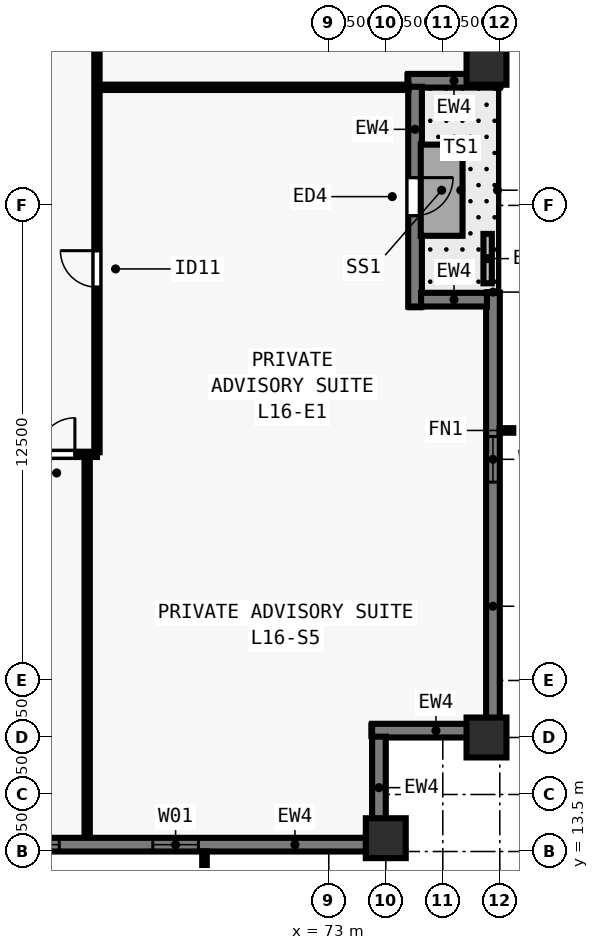
"""IFC4 building model, lengths in metres.
Left out: names, types, materials, properties, quantities, classifications, styles, units other than length and angle.
Written with IfcOpenShell. Run it as: python <this file> out.ifc"""

import sys

from ifc_helpers import new_model, si_unit, direction, frame, frame_2d, origin, origin_2d, place, context, subcontext, project, spatial, rectangle, extrude, element, fill, save


model = new_model("IFC4")
c1 = context("Model", 3, precision=1e-05, world=origin(), true_north=direction((0.0, 1.0)))
c2 = subcontext(c1, "Body", "Model", "MODEL_VIEW")
j1 = project(units=[si_unit("LENGTHUNIT", "METRE"), si_unit("PLANEANGLEUNIT", "RADIAN")], contexts=[c1])
p1 = place(None, origin())
s1 = spatial("IfcSite", under=j1, at=p1, CompositionType="ELEMENT")
p2 = place(p1, origin())
s2 = spatial("IfcBuilding", under=s1, at=p2, CompositionType="ELEMENT")
p3 = place(p2, frame((0.0, 0.0, 62.0)))
s3 = spatial("IfcBuildingStorey", under=s2, at=p3, CompositionType="ELEMENT", Elevation=62.0)
for number, where, z_axis, x_axis in (
    (1, (74.5, 13.85, 0.0), (0.0, 0.0, 1.0), (1.0, 0.0, 0.0)),
    (2, (77.15, 16.5, 0.0), (0.0, 0.0, 1.0), (0.0, 1.0, 0.0)),
    (3, (77.15, 34.2, 0.0), (0.0, 0.0, 1.0), (0.0, 1.0, 0.0)),
):
    element("IfcColumn", number, at=place(p3, frame(where, z_axis=z_axis, x_axis=x_axis)), inside=s3, PredefinedType="COLUMN", context=c2, shape_type="SweptSolid", body=[
        extrude(rectangle(XDim=1.05, YDim=1.05, at=origin_2d()), origin(), (0.0, 0.0, 1.0), 3.5),
    ])
p4 = place(p3, frame((77.32, 28.2, 0.0), z_axis=(0.0, 0.0, 1.0), x_axis=(0.0, -1.0, 0.0)))
e4 = element("IfcWall", 4, at=p4, inside=s3, PredefinedType="SOLIDWALL", context=c2, shape_type="SweptSolid", body=[
    extrude(rectangle(XDim=11.362, YDim=0.36, at=frame_2d((5.681, 0.0))), origin(), (0.0, 0.0, 1.0), 3.28),
])
p5 = place(p4, frame((3.781, 0.0, 0.8)))
e5 = element("IfcOpeningElement", 5, at=p5, cuts=e4, PredefinedType="OPENING", context=c2, shape_type="SweptSolid", body=[
    extrude(rectangle(XDim=1.2, YDim=1.544, at=frame_2d((0.6, 0.772))), frame((0.0, 0.19, 0.0), z_axis=(0.0, -1.0, 0.0), x_axis=(1.0, 0.0, 0.0)), (0.0, 0.0, 1.0), 0.38),
])
p6 = place(p3, frame((77.5, 16.68, 0.0), z_axis=(0.0, 0.0, 1.0), x_axis=(-1.0, 0.0, 0.0)))
e6 = element("IfcWall", 6, at=p6, inside=s3, PredefinedType="SOLIDWALL", context=c2, shape_type="SweptSolid", body=[
    extrude(rectangle(XDim=3.36, YDim=0.36, at=frame_2d((1.68, 0.0))), origin(), (0.0, 0.0, 1.0), 3.28),
])
p7 = place(p3, frame((74.32, 16.522, 0.0), z_axis=(0.0, 0.0, 1.0), x_axis=(0.0, -1.0, 0.0)))
e7 = element("IfcWall", 7, at=p7, inside=s3, PredefinedType="SOLIDWALL", context=c2, shape_type="SweptSolid", body=[
    extrude(rectangle(XDim=2.684, YDim=0.36, at=frame_2d((1.342, 0.0))), origin(), (0.0, 0.0, 1.0), 3.28),
])
p8 = place(p3, frame((74.5, 13.68, 0.0), z_axis=(0.0, 0.0, 1.0), x_axis=(-1.0, 0.0, 0.0)))
e8 = element("IfcWall", 8, at=p8, inside=s3, PredefinedType="SOLIDWALL", context=c2, shape_type="SweptSolid", body=[
    extrude(rectangle(XDim=44.662, YDim=0.36, at=frame_2d((22.331, 0.0))), origin(), (0.0, 0.0, 1.0), 3.28),
])
p9 = place(p8, frame((4.93, 0.0, 0.8)))
e9 = element("IfcOpeningElement", 9, at=p9, cuts=e8, PredefinedType="OPENING", context=c2, shape_type="SweptSolid", body=[
    extrude(rectangle(XDim=1.2, YDim=1.544, at=frame_2d((0.6, 0.772))), frame((0.0, 0.19, 0.0), z_axis=(0.0, -1.0, 0.0), x_axis=(1.0, 0.0, 0.0)), (0.0, 0.0, 1.0), 0.38),
])
p10 = place(p8, frame((8.59, 0.0, 0.8)))
e10 = element("IfcOpeningElement", 10, at=p10, cuts=e8, PredefinedType="OPENING", context=c2, shape_type="SweptSolid", body=[
    extrude(rectangle(XDim=1.5, YDim=1.544, at=frame_2d((0.75, 0.772))), frame((0.0, 0.19, 0.0), z_axis=(0.0, -1.0, 0.0), x_axis=(1.0, 0.0, 0.0)), (0.0, 0.0, 1.0), 0.38),
])
p11 = place(p8, frame((11.65, 0.0, 0.8)))
e11 = element("IfcOpeningElement", 11, at=p11, cuts=e8, PredefinedType="OPENING", context=c2, shape_type="SweptSolid", body=[
    extrude(rectangle(XDim=1.2, YDim=1.544, at=frame_2d((0.6, 0.772))), frame((0.0, 0.19, 0.0), z_axis=(0.0, -1.0, 0.0), x_axis=(1.0, 0.0, 0.0)), (0.0, 0.0, 1.0), 0.38),
])
p12 = place(p8, frame((14.861, 0.0, 0.8)))
e12 = element("IfcOpeningElement", 12, at=p12, cuts=e8, PredefinedType="OPENING", context=c2, shape_type="SweptSolid", body=[
    extrude(rectangle(XDim=1.5, YDim=1.544, at=frame_2d((0.75, 0.772))), frame((0.0, 0.19, 0.0), z_axis=(0.0, -1.0, 0.0), x_axis=(1.0, 0.0, 0.0)), (0.0, 0.0, 1.0), 0.38),
])
p13 = place(p8, frame((18.821, 0.0, 0.8)))
e13 = element("IfcOpeningElement", 13, at=p13, cuts=e8, PredefinedType="OPENING", context=c2, shape_type="SweptSolid", body=[
    extrude(rectangle(XDim=1.2, YDim=1.544, at=frame_2d((0.6, 0.772))), frame((0.0, 0.19, 0.0), z_axis=(0.0, -1.0, 0.0), x_axis=(1.0, 0.0, 0.0)), (0.0, 0.0, 1.0), 0.38),
])
p14 = place(p8, frame((21.581, 0.0, 0.8)))
e14 = element("IfcOpeningElement", 14, at=p14, cuts=e8, PredefinedType="OPENING", context=c2, shape_type="SweptSolid", body=[
    extrude(rectangle(XDim=1.5, YDim=1.544, at=frame_2d((0.75, 0.772))), frame((0.0, 0.19, 0.0), z_axis=(0.0, -1.0, 0.0), x_axis=(1.0, 0.0, 0.0)), (0.0, 0.0, 1.0), 0.38),
])
p15 = place(p8, frame((25.091, 0.0, 0.8)))
e15 = element("IfcOpeningElement", 15, at=p15, cuts=e8, PredefinedType="OPENING", context=c2, shape_type="SweptSolid", body=[
    extrude(rectangle(XDim=1.2, YDim=1.544, at=frame_2d((0.6, 0.772))), frame((0.0, 0.19, 0.0), z_axis=(0.0, -1.0, 0.0), x_axis=(1.0, 0.0, 0.0)), (0.0, 0.0, 1.0), 0.38),
])
p16 = place(p8, frame((28.302, 0.0, 0.8)))
e16 = element("IfcOpeningElement", 16, at=p16, cuts=e8, PredefinedType="OPENING", context=c2, shape_type="SweptSolid", body=[
    extrude(rectangle(XDim=1.5, YDim=1.544, at=frame_2d((0.75, 0.772))), frame((0.0, 0.19, 0.0), z_axis=(0.0, -1.0, 0.0), x_axis=(1.0, 0.0, 0.0)), (0.0, 0.0, 1.0), 0.38),
])
p17 = place(p8, frame((31.812, 0.0, 0.8)))
e17 = element("IfcOpeningElement", 17, at=p17, cuts=e8, PredefinedType="OPENING", context=c2, shape_type="SweptSolid", body=[
    extrude(rectangle(XDim=1.2, YDim=1.544, at=frame_2d((0.6, 0.772))), frame((0.0, 0.19, 0.0), z_axis=(0.0, -1.0, 0.0), x_axis=(1.0, 0.0, 0.0)), (0.0, 0.0, 1.0), 0.38),
])
p18 = place(p8, frame((35.022, 0.0, 0.8)))
e18 = element("IfcOpeningElement", 18, at=p18, cuts=e8, PredefinedType="OPENING", context=c2, shape_type="SweptSolid", body=[
    extrude(rectangle(XDim=1.5, YDim=1.544, at=frame_2d((0.75, 0.772))), frame((0.0, 0.19, 0.0), z_axis=(0.0, -1.0, 0.0), x_axis=(1.0, 0.0, 0.0)), (0.0, 0.0, 1.0), 0.38),
])
p19 = place(p8, frame((38.532, 0.0, 0.8)))
e19 = element("IfcOpeningElement", 19, at=p19, cuts=e8, PredefinedType="OPENING", context=c2, shape_type="SweptSolid", body=[
    extrude(rectangle(XDim=1.2, YDim=1.544, at=frame_2d((0.6, 0.772))), frame((0.0, 0.19, 0.0), z_axis=(0.0, -1.0, 0.0), x_axis=(1.0, 0.0, 0.0)), (0.0, 0.0, 1.0), 0.38),
])
p20 = place(p3, frame((77.32, 61.5, 0.0), z_axis=(0.0, 0.0, 1.0), x_axis=(0.0, -1.0, 0.0)))
e20 = element("IfcWall", 20, at=p20, inside=s3, PredefinedType="SOLIDWALL", context=c2, shape_type="SweptSolid", body=[
    extrude(rectangle(XDim=27.562, YDim=0.36, at=frame_2d((13.781, 0.0))), origin(), (0.0, 0.0, 1.0), 3.28),
])
p21 = place(p20, frame((4.905, 0.0, 0.8)))
e21 = element("IfcOpeningElement", 21, at=p21, cuts=e20, PredefinedType="OPENING", context=c2, shape_type="SweptSolid", body=[
    extrude(rectangle(XDim=1.2, YDim=1.544, at=frame_2d((0.6, 0.772))), frame((0.0, 0.19, 0.0), z_axis=(0.0, -1.0, 0.0), x_axis=(1.0, 0.0, 0.0)), (0.0, 0.0, 1.0), 0.38),
])
p22 = place(p20, frame((8.065, 0.0, 0.8)))
e22 = element("IfcOpeningElement", 22, at=p22, cuts=e20, PredefinedType="OPENING", context=c2, shape_type="SweptSolid", body=[
    extrude(rectangle(XDim=1.5, YDim=1.544, at=frame_2d((0.75, 0.772))), frame((0.0, 0.19, 0.0), z_axis=(0.0, -1.0, 0.0), x_axis=(1.0, 0.0, 0.0)), (0.0, 0.0, 1.0), 0.38),
])
p23 = place(p20, frame((11.526, 0.0, 0.8)))
e23 = element("IfcOpeningElement", 23, at=p23, cuts=e20, PredefinedType="OPENING", context=c2, shape_type="SweptSolid", body=[
    extrude(rectangle(XDim=1.2, YDim=1.544, at=frame_2d((0.6, 0.772))), frame((0.0, 0.19, 0.0), z_axis=(0.0, -1.0, 0.0), x_axis=(1.0, 0.0, 0.0)), (0.0, 0.0, 1.0), 0.38),
])
p24 = place(p20, frame((14.686, 0.0, 0.8)))
e24 = element("IfcOpeningElement", 24, at=p24, cuts=e20, PredefinedType="OPENING", context=c2, shape_type="SweptSolid", body=[
    extrude(rectangle(XDim=1.5, YDim=1.544, at=frame_2d((0.75, 0.772))), frame((0.0, 0.19, 0.0), z_axis=(0.0, -1.0, 0.0), x_axis=(1.0, 0.0, 0.0)), (0.0, 0.0, 1.0), 0.38),
])
p25 = place(p20, frame((18.596, 0.0, 0.8)))
e25 = element("IfcOpeningElement", 25, at=p25, cuts=e20, PredefinedType="OPENING", context=c2, shape_type="SweptSolid", body=[
    extrude(rectangle(XDim=1.2, YDim=1.544, at=frame_2d((0.6, 0.772))), frame((0.0, 0.19, 0.0), z_axis=(0.0, -1.0, 0.0), x_axis=(1.0, 0.0, 0.0)), (0.0, 0.0, 1.0), 0.38),
])
p26 = place(p20, frame((21.307, 0.0, 0.8)))
e26 = element("IfcOpeningElement", 26, at=p26, cuts=e20, PredefinedType="OPENING", context=c2, shape_type="SweptSolid", body=[
    extrude(rectangle(XDim=1.5, YDim=1.544, at=frame_2d((0.75, 0.772))), frame((0.0, 0.19, 0.0), z_axis=(0.0, -1.0, 0.0), x_axis=(1.0, 0.0, 0.0)), (0.0, 0.0, 1.0), 0.38),
])
p27 = place(p3, frame((77.5, 33.78, 0.0), z_axis=(0.0, 0.0, 1.0), x_axis=(-1.0, 0.0, 0.0)))
e27 = element("IfcWall", 27, at=p27, inside=s3, PredefinedType="SOLIDWALL", context=c2, shape_type="SweptSolid", body=[
    extrude(rectangle(XDim=2.41, YDim=0.36, at=frame_2d((1.205, 0.0))), origin(), (0.0, 0.0, 1.0), 3.28),
])
p28 = place(p3, frame((75.27, 33.622, 0.0), z_axis=(0.0, 0.0, 1.0), x_axis=(0.0, -1.0, 0.0)))
e28 = element("IfcWall", 28, at=p28, inside=s3, PredefinedType="SOLIDWALL", context=c2, shape_type="SweptSolid", body=[
    extrude(rectangle(XDim=5.782, YDim=0.36, at=frame_2d((2.891, 0.0))), origin(), (0.0, 0.0, 1.0), 3.28),
])
p29 = place(p28, frame((2.391, 0.0, 0.0)))
e29 = element("IfcOpeningElement", 29, at=p29, cuts=e28, PredefinedType="OPENING", context=c2, shape_type="SweptSolid", body=[
    extrude(rectangle(XDim=1.0, YDim=2.15, at=frame_2d((0.5, 1.075))), frame((0.0, 0.19, 0.0), z_axis=(0.0, -1.0, 0.0), x_axis=(1.0, 0.0, 0.0)), (0.0, 0.0, 1.0), 0.38),
])
p30 = place(p3, frame((75.428, 28.02, 0.0), z_axis=(0.0, 0.0, 1.0), x_axis=(1.0, 0.0, 0.0)))
e30 = element("IfcWall", 30, at=p30, inside=s3, PredefinedType="SOLIDWALL", context=c2, shape_type="SweptSolid", body=[
    extrude(rectangle(XDim=1.734, YDim=0.36, at=frame_2d((0.867, 0.0))), origin(), (0.0, 0.0, 1.0), 3.28),
])
p31 = place(p3, frame((77.18, 28.45, 0.0), z_axis=(0.0, 0.0, 1.0), x_axis=(0.0, 1.0, 0.0)))
e31 = element("IfcWall", 31, at=p31, inside=s3, PredefinedType="PARAPET", context=c2, shape_type="SweptSolid", body=[
    extrude(rectangle(XDim=1.3, YDim=0.22, at=frame_2d((0.65, 0.0))), origin(), (0.0, 0.0, 1.0), 0.55),
])
p32 = place(p3, frame((37.1, 23.95, 0.0), z_axis=(0.0, 0.0, 1.0), x_axis=(1.0, 0.0, 0.0)))
e32 = element("IfcWall", 32, at=p32, inside=s3, PredefinedType="PARTITIONING", context=c2, shape_type="SweptSolid", body=[
    extrude(rectangle(XDim=29.8, YDim=0.14, at=frame_2d((14.9, 0.0))), origin(), (0.0, 0.0, 1.0), 3.28),
])
p33 = place(p32, frame((4.191, 0.0, 0.0)))
e33 = element("IfcOpeningElement", 33, at=p33, cuts=e32, PredefinedType="OPENING", context=c2, shape_type="SweptSolid", body=[
    extrude(rectangle(XDim=0.96, YDim=2.12, at=frame_2d((0.48, 1.06))), frame((0.0, 0.08, 0.0), z_axis=(0.0, -1.0, 0.0), x_axis=(1.0, 0.0, 0.0)), (0.0, 0.0, 1.0), 0.16),
])
p34 = place(p32, frame((5.358, 0.0, 0.0)))
e34 = element("IfcOpeningElement", 34, at=p34, cuts=e32, PredefinedType="OPENING", context=c2, shape_type="SweptSolid", body=[
    extrude(rectangle(XDim=0.96, YDim=2.12, at=frame_2d((0.48, 1.06))), frame((0.0, 0.08, 0.0), z_axis=(0.0, -1.0, 0.0), x_axis=(1.0, 0.0, 0.0)), (0.0, 0.0, 1.0), 0.16),
])
p35 = place(p32, frame((14.51, 0.0, 0.0)))
e35 = element("IfcOpeningElement", 35, at=p35, cuts=e32, PredefinedType="OPENING", context=c2, shape_type="SweptSolid", body=[
    extrude(rectangle(XDim=0.96, YDim=2.12, at=frame_2d((0.48, 1.06))), frame((0.0, 0.08, 0.0), z_axis=(0.0, -1.0, 0.0), x_axis=(1.0, 0.0, 0.0)), (0.0, 0.0, 1.0), 0.16),
])
p36 = place(p32, frame((24.542, 0.0, 0.0)))
e36 = element("IfcOpeningElement", 36, at=p36, cuts=e32, PredefinedType="OPENING", context=c2, shape_type="SweptSolid", body=[
    extrude(rectangle(XDim=0.96, YDim=2.12, at=frame_2d((0.48, 1.06))), frame((0.0, 0.08, 0.0), z_axis=(0.0, -1.0, 0.0), x_axis=(1.0, 0.0, 0.0)), (0.0, 0.0, 1.0), 0.16),
])
p37 = place(p32, frame((28.26, 0.0, 0.0)))
e37 = element("IfcOpeningElement", 37, at=p37, cuts=e32, PredefinedType="OPENING", context=c2, shape_type="SweptSolid", body=[
    extrude(rectangle(XDim=0.96, YDim=2.12, at=frame_2d((0.48, 1.06))), frame((0.0, 0.08, 0.0), z_axis=(0.0, -1.0, 0.0), x_axis=(1.0, 0.0, 0.0)), (0.0, 0.0, 1.0), 0.16),
])
p38 = place(p3, frame((66.9, 24.005, 0.0), z_axis=(0.0, 0.0, 1.0), x_axis=(0.0, 1.0, 0.0)))
e38 = element("IfcWall", 38, at=p38, inside=s3, PredefinedType="PARTITIONING", context=c2, shape_type="SweptSolid", body=[
    extrude(rectangle(XDim=29.99, YDim=0.14, at=frame_2d((14.995, 0.0))), origin(), (0.0, 0.0, 1.0), 3.28),
])
p39 = place(p38, frame((4.344, 0.0, 0.0)))
e39 = element("IfcOpeningElement", 39, at=p39, cuts=e38, PredefinedType="OPENING", context=c2, shape_type="SweptSolid", body=[
    extrude(rectangle(XDim=0.96, YDim=2.12, at=frame_2d((0.48, 1.06))), frame((0.0, 0.08, 0.0), z_axis=(0.0, -1.0, 0.0), x_axis=(1.0, 0.0, 0.0)), (0.0, 0.0, 1.0), 0.16),
])
p40 = place(p38, frame((14.452, 0.0, 0.0)))
e40 = element("IfcOpeningElement", 40, at=p40, cuts=e38, PredefinedType="OPENING", context=c2, shape_type="SweptSolid", body=[
    extrude(rectangle(XDim=0.96, YDim=2.12, at=frame_2d((0.48, 1.06))), frame((0.0, 0.08, 0.0), z_axis=(0.0, -1.0, 0.0), x_axis=(1.0, 0.0, 0.0)), (0.0, 0.0, 1.0), 0.16),
])
p41 = place(p38, frame((24.623, 0.0, 0.0)))
e41 = element("IfcOpeningElement", 41, at=p41, cuts=e38, PredefinedType="OPENING", context=c2, shape_type="SweptSolid", body=[
    extrude(rectangle(XDim=0.96, YDim=2.12, at=frame_2d((0.48, 1.06))), frame((0.0, 0.08, 0.0), z_axis=(0.0, -1.0, 0.0), x_axis=(1.0, 0.0, 0.0)), (0.0, 0.0, 1.0), 0.16),
])
p42 = place(p3, frame((66.643, 13.92, 0.0), z_axis=(0.0, 0.0, 1.0), x_axis=(0.0, 1.0, 0.0)))
e42 = element("IfcWall", 42, at=p42, inside=s3, PredefinedType="PARTITIONING", context=c2, shape_type="SweptSolid", body=[
    extrude(rectangle(XDim=9.93, YDim=0.14, at=frame_2d((4.965, 0.0))), origin(), (0.0, 0.0, 1.0), 2.439),
])
p43 = place(p3, frame((67.0, 33.607, 0.0), z_axis=(0.0, 0.0, 1.0), x_axis=(1.0, 0.0, 0.0)))
e43 = element("IfcWall", 43, at=p43, inside=s3, PredefinedType="PARTITIONING", context=c2, shape_type="SweptSolid", body=[
    extrude(rectangle(XDim=8.1, YDim=0.14, at=frame_2d((4.05, 0.0))), origin(), (0.0, 0.0, 1.0), 2.439),
])
p44 = place(p5, origin())
e44 = element("IfcWindow", 44, at=p44, inside=s3, PartitioningType="SINGLE_PANEL", PredefinedType="WINDOW", context=c2, shape_type="SweptSolid", body=[
    extrude(rectangle(XDim=1.2, YDim=1.544, at=frame_2d((0.6, 0.772))), frame((0.0, -0.05, 0.0), z_axis=(0.0, -1.0, 0.0), x_axis=(1.0, 0.0, 0.0)), (0.0, 0.0, 1.0), 0.06),
])
fill(e5, e44)
p45 = place(p9, origin())
e45 = element("IfcWindow", 45, at=p45, inside=s3, PartitioningType="SINGLE_PANEL", PredefinedType="WINDOW", context=c2, shape_type="SweptSolid", body=[
    extrude(rectangle(XDim=1.2, YDim=1.544, at=frame_2d((0.6, 0.772))), frame((0.0, -0.05, 0.0), z_axis=(0.0, -1.0, 0.0), x_axis=(1.0, 0.0, 0.0)), (0.0, 0.0, 1.0), 0.06),
])
fill(e9, e45)
p46 = place(p10, origin())
e46 = element("IfcWindow", 46, at=p46, inside=s3, PartitioningType="SINGLE_PANEL", PredefinedType="WINDOW", context=c2, shape_type="SweptSolid", body=[
    extrude(rectangle(XDim=1.5, YDim=1.544, at=frame_2d((0.75, 0.772))), frame((0.0, -0.05, 0.0), z_axis=(0.0, -1.0, 0.0), x_axis=(1.0, 0.0, 0.0)), (0.0, 0.0, 1.0), 0.06),
])
fill(e10, e46)
p47 = place(p29, origin())
e47 = element("IfcDoor", 47, at=p47, inside=s3, OperationType="SINGLE_SWING_LEFT", PredefinedType="DOOR", context=c2, shape_type="SweptSolid", body=[
    extrude(rectangle(XDim=1.0, YDim=2.15, at=frame_2d((0.5, 1.075))), frame((0.0, 0.025, 0.0), z_axis=(0.0, -1.0, 0.0), x_axis=(1.0, 0.0, 0.0)), (0.0, 0.0, 1.0), 0.05),
])
fill(e29, e47)
p48 = place(p37, origin())
e48 = element("IfcDoor", 48, at=p48, inside=s3, OperationType="SINGLE_SWING_RIGHT", PredefinedType="DOOR", context=c2, shape_type="SweptSolid", body=[
    extrude(rectangle(XDim=0.96, YDim=2.12, at=frame_2d((0.48, 1.06))), frame((0.0, 0.025, 0.0), z_axis=(0.0, -1.0, 0.0), x_axis=(1.0, 0.0, 0.0)), (0.0, 0.0, 1.0), 0.05),
])
fill(e37, e48)
p49 = place(p39, origin())
e49 = element("IfcDoor", 49, at=p49, inside=s3, OperationType="SINGLE_SWING_RIGHT", PredefinedType="DOOR", context=c2, shape_type="SweptSolid", body=[
    extrude(rectangle(XDim=0.96, YDim=2.12, at=frame_2d((0.48, 1.06))), frame((0.0, 0.025, 0.0), z_axis=(0.0, -1.0, 0.0), x_axis=(1.0, 0.0, 0.0)), (0.0, 0.0, 1.0), 0.05),
])
fill(e39, e49)
save(model, sys.argv[1])
